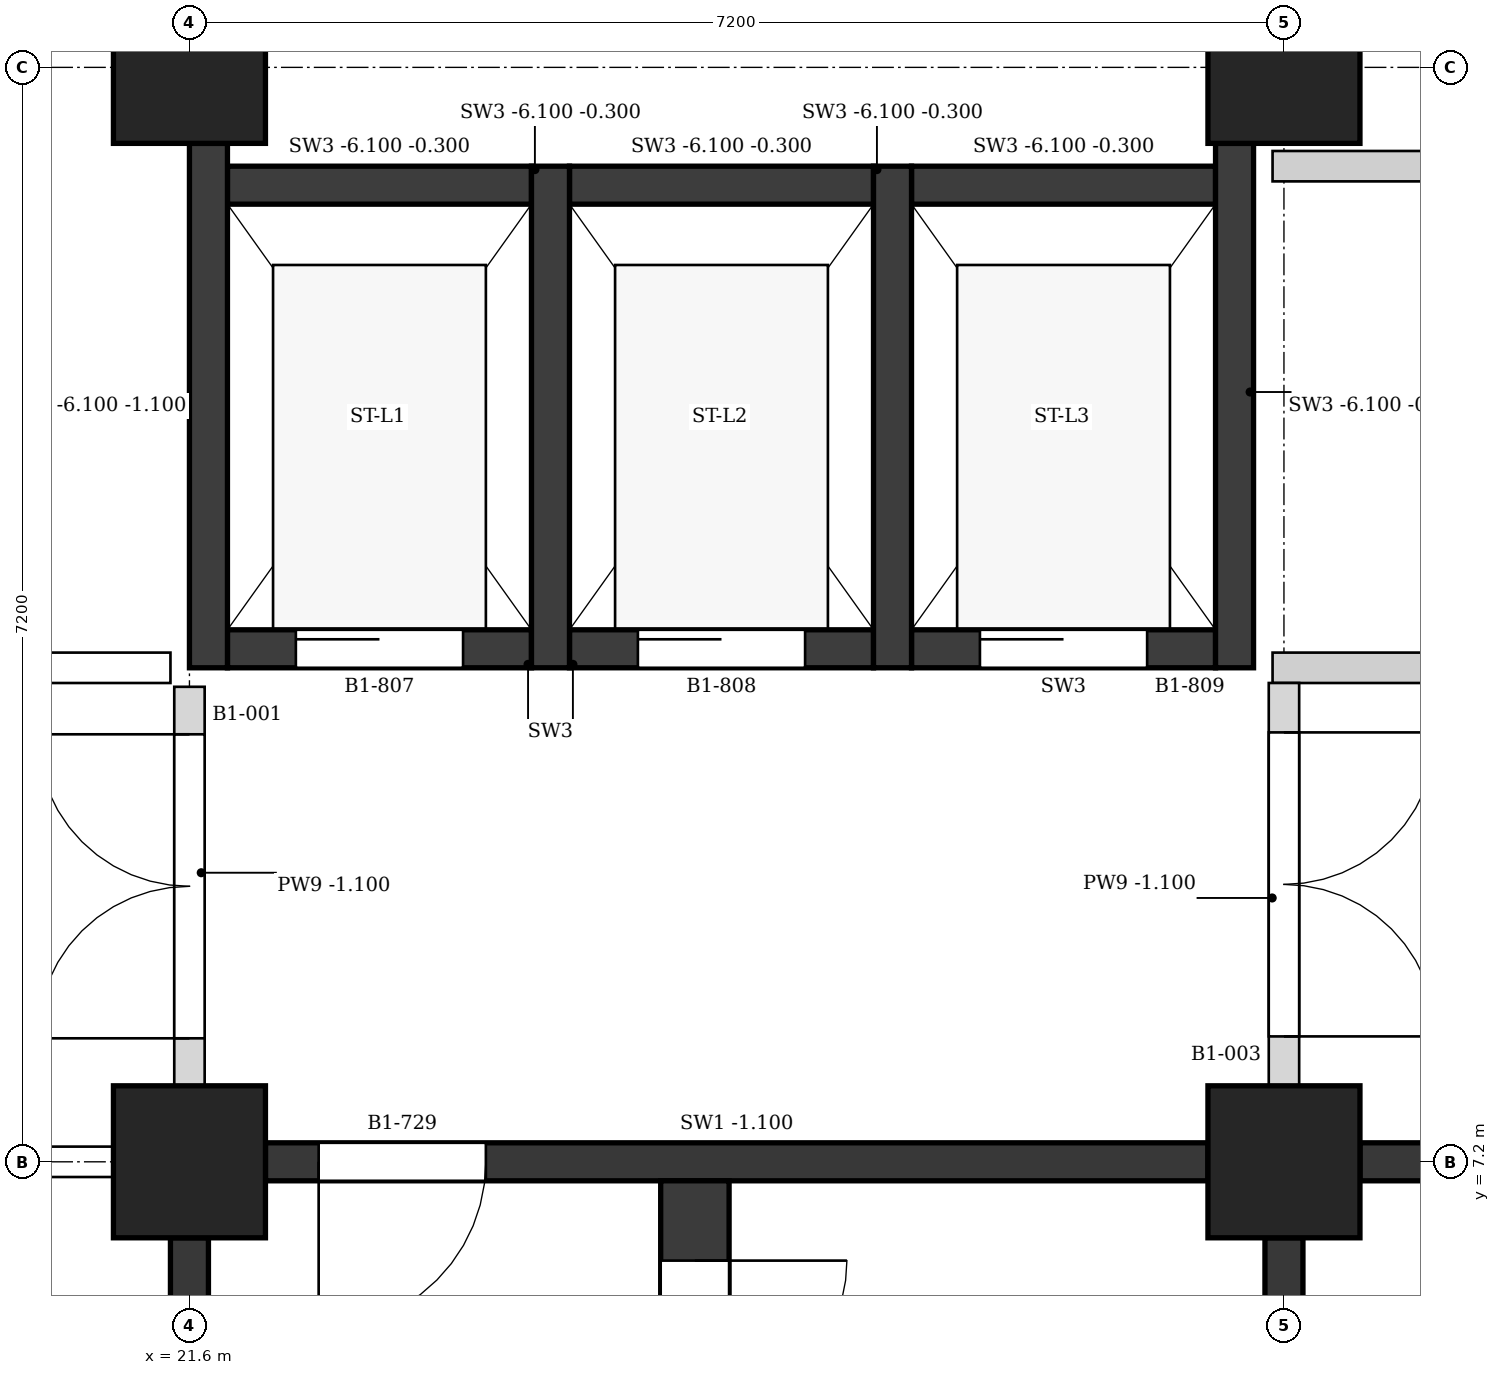
"""IFC4 building model, lengths in metres.
Left out: names, types, materials, properties, quantities, classifications, styles, units other than length and angle.
Written with IfcOpenShell. Run it as: python <this file> out.ifc"""

import sys

from ifc_helpers import new_model, si_unit, direction, frame, frame_2d, origin, origin_2d, place, context, subcontext, project, spatial, polyline, rectangle, outline, extrude, element, fill, save


model = new_model("IFC4")
c1 = context("Model", 3, precision=1e-05, world=origin(), true_north=direction((0.0, 1.0)))
c2 = subcontext(c1, "Body", "Model", "MODEL_VIEW")
j1 = project(units=[si_unit("LENGTHUNIT", "METRE"), si_unit("PLANEANGLEUNIT", "RADIAN")], contexts=[c1])
p1 = place(None, origin())
s1 = spatial("IfcSite", under=j1, at=p1, CompositionType="ELEMENT")
p2 = place(p1, origin())
s2 = spatial("IfcBuilding", under=s1, at=p2, CompositionType="ELEMENT")
p3 = place(p2, frame((0.0, 0.0, -4.5)))
s3 = spatial("IfcBuildingStorey", under=s2, at=p3, CompositionType="ELEMENT", Elevation=-4.5)
for number, where, z_axis, x_axis in (
    (1, (21.6, 7.2, 0.0), (0.0, 0.0, 1.0), (1.0, 0.0, 0.0)),
    (2, (21.6, 14.4, 0.0), (0.0, 0.0, 1.0), (1.0, 0.0, 0.0)),
    (3, (28.8, 7.2, 0.0), (0.0, 0.0, 1.0), (1.0, 0.0, 0.0)),
    (4, (28.8, 14.4, 0.0), (0.0, 0.0, 1.0), (1.0, 0.0, 0.0)),
):
    element("IfcColumn", number, at=place(p3, frame(where, z_axis=z_axis, x_axis=x_axis)), inside=s3, PredefinedType="COLUMN", context=c2, shape_type="SweptSolid", body=[
        extrude(rectangle(XDim=1.0, YDim=1.0, at=origin_2d()), origin(), (0.0, 0.0, 1.0), 4.5),
    ])
p4 = place(p3, frame((29.3, 7.2, 0.0), z_axis=(0.0, 0.0, 1.0), x_axis=(1.0, 0.0, 0.0)))
e5 = element("IfcWall", 5, at=p4, inside=s3, PredefinedType="SHEAR", context=c2, shape_type="SweptSolid", body=[
    extrude(rectangle(XDim=6.275, YDim=0.25, at=frame_2d((3.137, 0.0))), origin(), (0.0, 0.0, 1.0), 3.4),
])
p5 = place(p4, frame((4.75, 0.0, 0.0)))
e6 = element("IfcOpeningElement", 6, at=p5, cuts=e5, PredefinedType="OPENING", context=c2, shape_type="SweptSolid", body=[
    extrude(rectangle(XDim=1.1, YDim=2.1, at=frame_2d((0.55, 1.05))), frame((0.0, 0.135, 0.0), z_axis=(0.0, -1.0, 0.0), x_axis=(1.0, 0.0, 0.0)), (0.0, 0.0, 1.0), 0.27),
])
p6 = place(p3, frame((28.8, 0.5, 0.0), z_axis=(0.0, 0.0, 1.0), x_axis=(0.0, 1.0, 0.0)))
e7 = element("IfcWall", 7, at=p6, inside=s3, PredefinedType="SHEAR", context=c2, shape_type="SweptSolid", body=[
    extrude(rectangle(XDim=6.2, YDim=0.25, at=frame_2d((3.1, 0.0))), origin(), (0.0, 0.0, 1.0), 3.4),
])
p7 = place(p3, frame((22.1, 7.2, 0.0), z_axis=(0.0, 0.0, 1.0), x_axis=(1.0, 0.0, 0.0)))
e8 = element("IfcWall", 8, at=p7, inside=s3, PredefinedType="SHEAR", context=c2, shape_type="SweptSolid", body=[
    extrude(rectangle(XDim=6.2, YDim=0.25, at=frame_2d((3.1, 0.0))), origin(), (0.0, 0.0, 1.0), 3.4),
])
p8 = place(p7, frame((0.35, 0.0, 0.0)))
e9 = element("IfcOpeningElement", 9, at=p8, cuts=e8, PredefinedType="OPENING", context=c2, shape_type="SweptSolid", body=[
    extrude(rectangle(XDim=1.1, YDim=2.1, at=frame_2d((0.55, 1.05))), frame((0.0, 0.135, 0.0), z_axis=(0.0, -1.0, 0.0), x_axis=(1.0, 0.0, 0.0)), (0.0, 0.0, 1.0), 0.27),
])
p9 = place(p3, frame((21.6, 0.5, 0.0), z_axis=(0.0, 0.0, 1.0), x_axis=(0.0, 1.0, 0.0)))
e10 = element("IfcWall", 10, at=p9, inside=s3, PredefinedType="SHEAR", context=c2, shape_type="SweptSolid", body=[
    extrude(rectangle(XDim=6.2, YDim=0.25, at=frame_2d((3.1, 0.0))), origin(), (0.0, 0.0, 1.0), 3.4),
])
p10 = place(p3, frame((24.925, 0.2, 0.0), z_axis=(0.0, 0.0, 1.0), x_axis=(0.0, 1.0, 0.0)))
e11 = element("IfcWall", 11, at=p10, inside=s3, PredefinedType="SHEAR", context=c2, shape_type="SweptSolid", body=[
    extrude(rectangle(XDim=6.875, YDim=0.45, at=frame_2d((3.438, 0.0))), origin(), (0.0, 0.0, 1.0), 4.2),
])
p11 = place(p10, frame((5.35, 0.0, 0.0)))
e12 = element("IfcOpeningElement", 12, at=p11, cuts=e11, PredefinedType="OPENING", context=c2, shape_type="SweptSolid", body=[
    extrude(rectangle(XDim=1.0, YDim=2.1, at=frame_2d((0.5, 1.05))), frame((0.0, 0.235, 0.0), z_axis=(0.0, -1.0, 0.0), x_axis=(1.0, 0.0, 0.0)), (0.0, 0.0, 1.0), 0.47),
])
p12 = place(p3, frame((21.725, 10.45, -1.6), z_axis=(0.0, 0.0, 1.0), x_axis=(0.0, 1.0, 0.0)))
e13 = element("IfcWall", 13, at=p12, inside=s3, PredefinedType="SHEAR", context=c2, shape_type="SweptSolid", body=[
    extrude(rectangle(XDim=3.45, YDim=0.25, at=frame_2d((1.725, 0.0))), origin(), (0.0, 0.0, 1.0), 5.0),
])
for number, where, z_axis, x_axis in (
    (14, (23.975, 10.45, -1.6), (0.0, 0.0, 1.0), (0.0, 1.0, 0.0)),
    (15, (26.225, 10.45, -1.6), (0.0, 0.0, 1.0), (0.0, 1.0, 0.0)),
):
    element("IfcWall", number, at=place(p3, frame(where, z_axis=z_axis, x_axis=x_axis)), inside=s3, PredefinedType="SHEAR", context=c2, shape_type="SweptSolid", body=[
        extrude(rectangle(XDim=3.3, YDim=0.25, at=frame_2d((1.65, 0.0))), origin(), (0.0, 0.0, 1.0), 5.8),
    ])
p13 = place(p3, frame((28.475, 10.45, -1.6), z_axis=(0.0, 0.0, 1.0), x_axis=(0.0, 1.0, 0.0)))
e16 = element("IfcWall", 16, at=p13, inside=s3, PredefinedType="SHEAR", context=c2, shape_type="SweptSolid", body=[
    extrude(rectangle(XDim=3.45, YDim=0.25, at=frame_2d((1.725, 0.0))), origin(), (0.0, 0.0, 1.0), 5.8),
])
p14 = place(p3, frame((21.85, 10.575, 0.0), z_axis=(0.0, 0.0, 1.0), x_axis=(1.0, 0.0, 0.0)))
e17 = element("IfcWall", 17, at=p14, inside=s3, PredefinedType="SHEAR", context=c2, shape_type="SweptSolid", body=[
    extrude(rectangle(XDim=2.0, YDim=0.25, at=frame_2d((1.0, 0.0))), origin(), (0.0, 0.0, 1.0), 4.2),
])
p15 = place(p14, frame((0.45, 0.0, 0.0)))
e18 = element("IfcOpeningElement", 18, at=p15, cuts=e17, PredefinedType="OPENING", context=c2, shape_type="SweptSolid", body=[
    extrude(rectangle(XDim=1.1, YDim=2.1, at=frame_2d((0.55, 1.05))), frame((0.0, 0.135, 0.0), z_axis=(0.0, -1.0, 0.0), x_axis=(1.0, 0.0, 0.0)), (0.0, 0.0, 1.0), 0.27),
])
p16 = place(p3, frame((21.85, 13.625, -1.6), z_axis=(0.0, 0.0, 1.0), x_axis=(1.0, 0.0, 0.0)))
e19 = element("IfcWall", 19, at=p16, inside=s3, PredefinedType="SHEAR", context=c2, shape_type="SweptSolid", body=[
    extrude(rectangle(XDim=2.0, YDim=0.25, at=frame_2d((1.0, 0.0))), origin(), (0.0, 0.0, 1.0), 5.8),
])
p17 = place(p3, frame((24.1, 10.575, 0.0), z_axis=(0.0, 0.0, 1.0), x_axis=(1.0, 0.0, 0.0)))
e20 = element("IfcWall", 20, at=p17, inside=s3, PredefinedType="SHEAR", context=c2, shape_type="SweptSolid", body=[
    extrude(rectangle(XDim=2.0, YDim=0.25, at=frame_2d((1.0, 0.0))), origin(), (0.0, 0.0, 1.0), 4.2),
])
p18 = place(p17, frame((0.45, 0.0, 0.0)))
e21 = element("IfcOpeningElement", 21, at=p18, cuts=e20, PredefinedType="OPENING", context=c2, shape_type="SweptSolid", body=[
    extrude(rectangle(XDim=1.1, YDim=2.1, at=frame_2d((0.55, 1.05))), frame((0.0, 0.135, 0.0), z_axis=(0.0, -1.0, 0.0), x_axis=(1.0, 0.0, 0.0)), (0.0, 0.0, 1.0), 0.27),
])
p19 = place(p3, frame((24.1, 13.625, -1.6), z_axis=(0.0, 0.0, 1.0), x_axis=(1.0, 0.0, 0.0)))
e22 = element("IfcWall", 22, at=p19, inside=s3, PredefinedType="SHEAR", context=c2, shape_type="SweptSolid", body=[
    extrude(rectangle(XDim=2.0, YDim=0.25, at=frame_2d((1.0, 0.0))), origin(), (0.0, 0.0, 1.0), 5.8),
])
p20 = place(p3, frame((26.35, 10.575, 0.0), z_axis=(0.0, 0.0, 1.0), x_axis=(1.0, 0.0, 0.0)))
e23 = element("IfcWall", 23, at=p20, inside=s3, PredefinedType="SHEAR", context=c2, shape_type="SweptSolid", body=[
    extrude(rectangle(XDim=2.0, YDim=0.25, at=frame_2d((1.0, 0.0))), origin(), (0.0, 0.0, 1.0), 4.2),
])
p21 = place(p20, frame((0.45, 0.0, 0.0)))
e24 = element("IfcOpeningElement", 24, at=p21, cuts=e23, PredefinedType="OPENING", context=c2, shape_type="SweptSolid", body=[
    extrude(rectangle(XDim=1.1, YDim=2.1, at=frame_2d((0.55, 1.05))), frame((0.0, 0.135, 0.0), z_axis=(0.0, -1.0, 0.0), x_axis=(1.0, 0.0, 0.0)), (0.0, 0.0, 1.0), 0.27),
])
p22 = place(p3, frame((26.35, 13.625, -1.6), z_axis=(0.0, 0.0, 1.0), x_axis=(1.0, 0.0, 0.0)))
e25 = element("IfcWall", 25, at=p22, inside=s3, PredefinedType="SHEAR", context=c2, shape_type="SweptSolid", body=[
    extrude(rectangle(XDim=2.0, YDim=0.25, at=frame_2d((1.0, 0.0))), origin(), (0.0, 0.0, 1.0), 5.8),
])
p23 = place(p3, frame((14.9, 7.2, 0.0), z_axis=(0.0, 0.0, 1.0), x_axis=(1.0, 0.0, 0.0)))
e26 = element("IfcWall", 26, at=p23, inside=s3, PredefinedType="PARTITIONING", context=c2, shape_type="SweptSolid", body=[
    extrude(rectangle(XDim=6.2, YDim=0.2, at=frame_2d((3.1, 0.0))), origin(), (0.0, 0.0, 1.0), 3.4),
])
p24 = place(p23, frame((2.6, 0.0, 0.0)))
e27 = element("IfcOpeningElement", 27, at=p24, cuts=e26, PredefinedType="OPENING", context=c2, shape_type="SweptSolid", body=[
    extrude(rectangle(XDim=1.0, YDim=2.1, at=frame_2d((0.5, 1.05))), frame((0.0, 0.11, 0.0), z_axis=(0.0, -1.0, 0.0), x_axis=(1.0, 0.0, 0.0)), (0.0, 0.0, 1.0), 0.22),
])
p25 = place(p3, frame((14.4, 10.45, 0.0), z_axis=(0.0, 0.0, 1.0), x_axis=(1.0, 0.0, 0.0)))
e28 = element("IfcWall", 28, at=p25, inside=s3, PredefinedType="SOLIDWALL", context=c2, shape_type="SweptSolid", body=[
    extrude(outline(polyline([(0.0, 0.0), (7.075, 0.0), (7.075, 3.4), (6.9, 3.4), (6.9, 4.2), (0.3, 4.2), (0.3, 3.4), (0.0, 3.4), (0.0, 0.0)])), frame((0.0, 0.1, 0.0), z_axis=(0.0, -1.0, 0.0), x_axis=(1.0, 0.0, 0.0)), (0.0, 0.0, 1.0), 0.2),
])
p26 = place(p25, frame((3.088, 0.0, 0.0)))
e29 = element("IfcOpeningElement", 29, at=p26, cuts=e28, PredefinedType="OPENING", context=c2, shape_type="SweptSolid", body=[
    extrude(rectangle(XDim=0.9, YDim=2.1, at=frame_2d((0.45, 1.05))), frame((0.0, 0.11, 0.0), z_axis=(0.0, -1.0, 0.0), x_axis=(1.0, 0.0, 0.0)), (0.0, 0.0, 1.0), 0.22),
])
p27 = place(p3, frame((28.725, 10.45, 0.0), z_axis=(0.0, 0.0, 1.0), x_axis=(1.0, 0.0, 0.0)))
e30 = element("IfcWall", 30, at=p27, inside=s3, PredefinedType="PARTITIONING", context=c2, shape_type="SweptSolid", body=[
    extrude(outline(polyline([(0.0, 0.0), (7.375, 0.0), (7.375, 3.4), (6.975, 3.4), (6.975, 4.2), (0.375, 4.2), (0.375, 3.4), (0.0, 3.4), (0.0, 0.0)])), frame((0.0, 0.1, 0.0), z_axis=(0.0, -1.0, 0.0), x_axis=(1.0, 0.0, 0.0)), (0.0, 0.0, 1.0), 0.2),
])
p28 = place(p27, frame((3.075, 0.0, 0.0)))
e31 = element("IfcOpeningElement", 31, at=p28, cuts=e30, PredefinedType="OPENING", context=c2, shape_type="SweptSolid", body=[
    extrude(rectangle(XDim=1.2, YDim=2.1, at=frame_2d((0.6, 1.05))), frame((0.0, 0.11, 0.0), z_axis=(0.0, -1.0, 0.0), x_axis=(1.0, 0.0, 0.0)), (0.0, 0.0, 1.0), 0.22),
])
p29 = place(p3, frame((28.725, 13.75, 0.0), z_axis=(0.0, 0.0, 1.0), x_axis=(1.0, 0.0, 0.0)))
e32 = element("IfcWall", 32, at=p29, inside=s3, PredefinedType="PARTITIONING", context=c2, shape_type="SweptSolid", body=[
    extrude(outline(polyline([(0.0, 0.0), (7.175, 0.0), (7.175, 3.4), (6.975, 3.4), (6.975, 4.2), (0.375, 4.2), (0.375, 3.4), (0.0, 3.4), (0.0, 0.0)])), frame((0.0, 0.1, 0.0), z_axis=(0.0, -1.0, 0.0), x_axis=(1.0, 0.0, 0.0)), (0.0, 0.0, 1.0), 0.2),
])
p30 = place(p3, frame((21.6, 7.7, 0.0), z_axis=(0.0, 0.0, 1.0), x_axis=(0.0, 1.0, 0.0)))
e33 = element("IfcWall", 33, at=p30, inside=s3, PredefinedType="PARTITIONING", context=c2, shape_type="SweptSolid", body=[
    extrude(rectangle(XDim=2.625, YDim=0.2, at=frame_2d((1.312, 0.0))), origin(), (0.0, 0.0, 1.0), 3.4),
])
p31 = place(p30, frame((0.312, 0.0, 0.0)))
e34 = element("IfcOpeningElement", 34, at=p31, cuts=e33, PredefinedType="OPENING", context=c2, shape_type="SweptSolid", body=[
    extrude(rectangle(XDim=2.0, YDim=2.4, at=frame_2d((1.0, 1.2))), frame((0.0, 0.11, 0.0), z_axis=(0.0, -1.0, 0.0), x_axis=(1.0, 0.0, 0.0)), (0.0, 0.0, 1.0), 0.22),
])
p32 = place(p3, frame((28.8, 7.7, 0.0), z_axis=(0.0, 0.0, 1.0), x_axis=(0.0, 1.0, 0.0)))
e35 = element("IfcWall", 35, at=p32, inside=s3, PredefinedType="PARTITIONING", context=c2, shape_type="SweptSolid", body=[
    extrude(rectangle(XDim=2.65, YDim=0.2, at=frame_2d((1.325, 0.0))), origin(), (0.0, 0.0, 1.0), 3.4),
])
p33 = place(p32, frame((0.325, 0.0, 0.0)))
e36 = element("IfcOpeningElement", 36, at=p33, cuts=e35, PredefinedType="OPENING", context=c2, shape_type="SweptSolid", body=[
    extrude(rectangle(XDim=2.0, YDim=2.4, at=frame_2d((1.0, 1.2))), frame((0.0, 0.11, 0.0), z_axis=(0.0, -1.0, 0.0), x_axis=(1.0, 0.0, 0.0)), (0.0, 0.0, 1.0), 0.22),
])
p34 = place(p11, frame((1.0, 0.0, 0.0), z_axis=(0.0, 0.0, 1.0), x_axis=(-1.0, 0.0, 0.0)))
e37 = element("IfcDoor", 37, at=p34, inside=s3, OperationType="SINGLE_SWING_LEFT", PredefinedType="DOOR", context=c2, shape_type="SweptSolid", body=[
    extrude(rectangle(XDim=1.0, YDim=2.1, at=frame_2d((0.5, 1.05))), frame((0.0, 0.025, 0.0), z_axis=(0.0, -1.0, 0.0), x_axis=(1.0, 0.0, 0.0)), (0.0, 0.0, 1.0), 0.05),
])
fill(e12, e37)
p35 = place(p8, frame((1.1, 0.0, 0.0), z_axis=(0.0, 0.0, 1.0), x_axis=(-1.0, 0.0, 0.0)))
e38 = element("IfcDoor", 38, at=p35, inside=s3, OperationType="SINGLE_SWING_RIGHT", PredefinedType="DOOR", context=c2, shape_type="SweptSolid", body=[
    extrude(rectangle(XDim=1.1, YDim=2.1, at=frame_2d((0.55, 1.05))), frame((0.0, 0.025, 0.0), z_axis=(0.0, -1.0, 0.0), x_axis=(1.0, 0.0, 0.0)), (0.0, 0.0, 1.0), 0.05),
])
fill(e9, e38)
p36 = place(p15, origin())
e39 = element("IfcDoor", 39, at=p36, inside=s3, OperationType="SLIDING_TO_LEFT", PredefinedType="DOOR", context=c2, shape_type="SweptSolid", body=[
    extrude(rectangle(XDim=1.1, YDim=2.1, at=frame_2d((0.55, 1.05))), frame((0.0, 0.025, 0.0), z_axis=(0.0, -1.0, 0.0), x_axis=(1.0, 0.0, 0.0)), (0.0, 0.0, 1.0), 0.05),
])
fill(e18, e39)
p37 = place(p18, origin())
e40 = element("IfcDoor", 40, at=p37, inside=s3, OperationType="SLIDING_TO_LEFT", PredefinedType="DOOR", context=c2, shape_type="SweptSolid", body=[
    extrude(rectangle(XDim=1.1, YDim=2.1, at=frame_2d((0.55, 1.05))), frame((0.0, 0.025, 0.0), z_axis=(0.0, -1.0, 0.0), x_axis=(1.0, 0.0, 0.0)), (0.0, 0.0, 1.0), 0.05),
])
fill(e21, e40)
p38 = place(p21, origin())
e41 = element("IfcDoor", 41, at=p38, inside=s3, OperationType="SLIDING_TO_LEFT", PredefinedType="DOOR", context=c2, shape_type="SweptSolid", body=[
    extrude(rectangle(XDim=1.1, YDim=2.1, at=frame_2d((0.55, 1.05))), frame((0.0, 0.025, 0.0), z_axis=(0.0, -1.0, 0.0), x_axis=(1.0, 0.0, 0.0)), (0.0, 0.0, 1.0), 0.05),
])
fill(e24, e41)
p39 = place(p31, origin())
e42 = element("IfcDoor", 42, at=p39, inside=s3, OperationType="DOUBLE_DOOR_SINGLE_SWING", PredefinedType="DOOR", context=c2, shape_type="SweptSolid", body=[
    extrude(rectangle(XDim=2.0, YDim=2.4, at=frame_2d((1.0, 1.2))), frame((0.0, 0.025, 0.0), z_axis=(0.0, -1.0, 0.0), x_axis=(1.0, 0.0, 0.0)), (0.0, 0.0, 1.0), 0.05),
])
fill(e34, e42)
p40 = place(p33, origin())
e43 = element("IfcDoor", 43, at=p40, inside=s3, OperationType="DOUBLE_DOOR_SINGLE_SWING", PredefinedType="DOOR", context=c2, shape_type="SweptSolid", body=[
    extrude(rectangle(XDim=2.0, YDim=2.4, at=frame_2d((1.0, 1.2))), frame((0.0, 0.025, 0.0), z_axis=(0.0, -1.0, 0.0), x_axis=(1.0, 0.0, 0.0)), (0.0, 0.0, 1.0), 0.05),
])
fill(e36, e43)
save(model, sys.argv[1])
